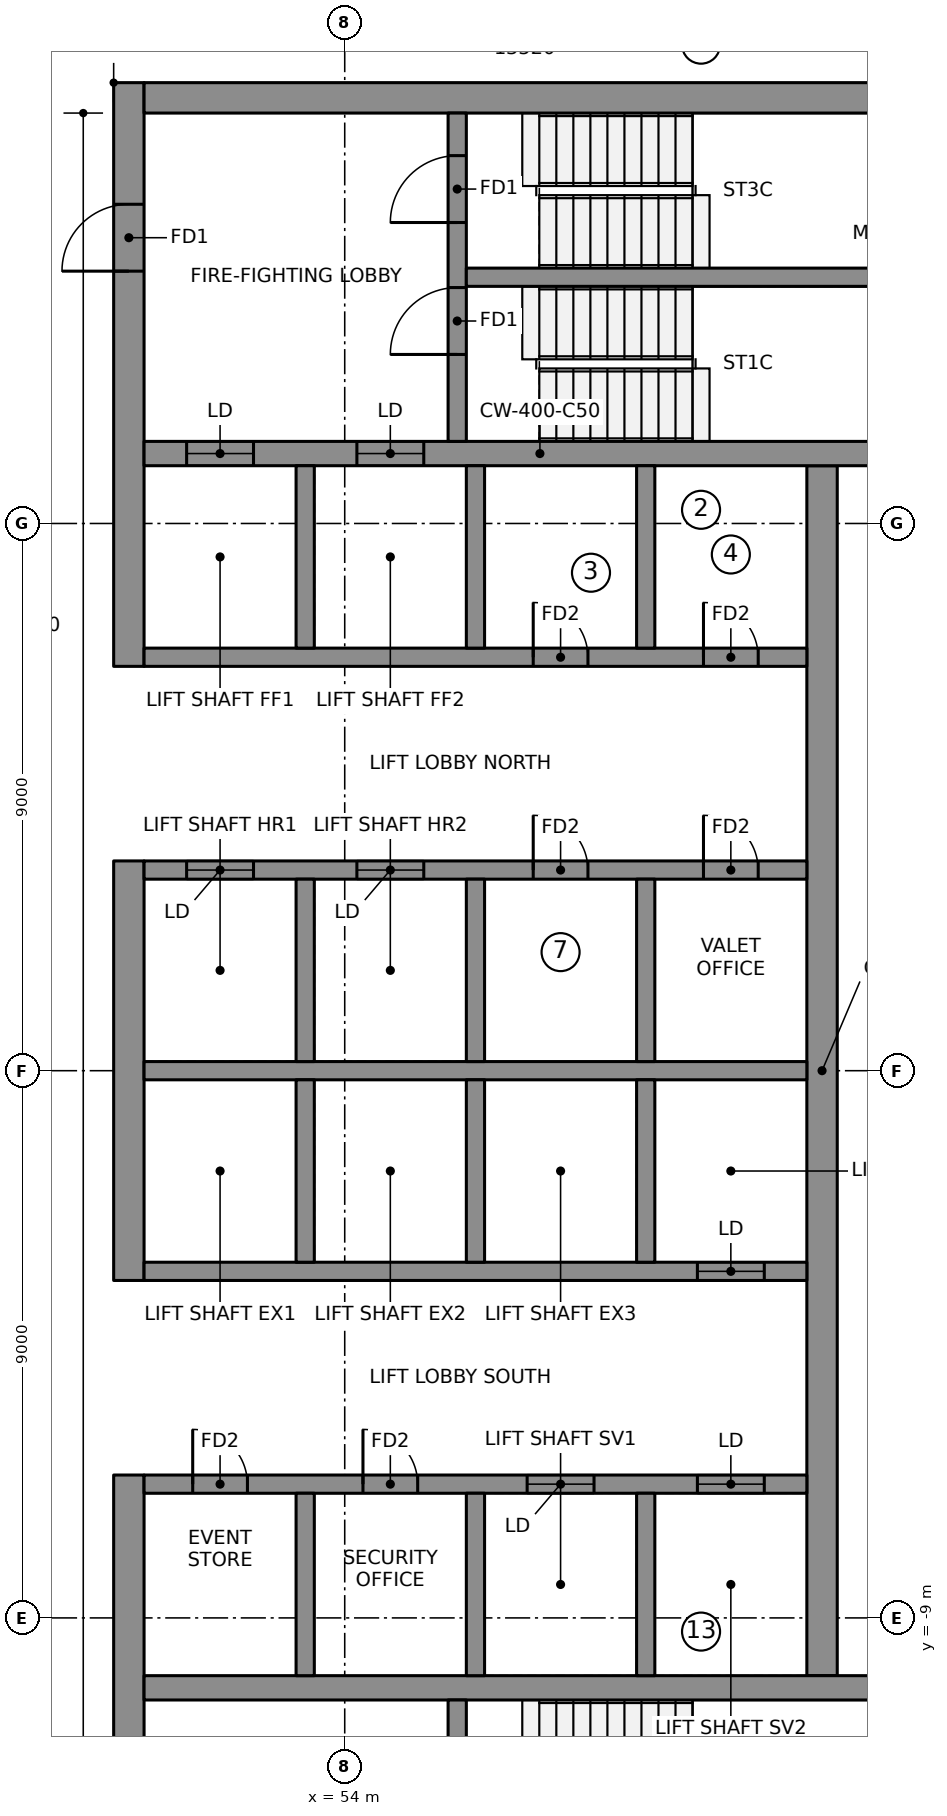
"""IFC4 building model, lengths in metres.
Left out: names, types, materials, properties, quantities, classifications, styles, units other than length and angle.
Written with IfcOpenShell. Run it as: python <this file> out.ifc"""

import sys

from ifc_helpers import new_model, si_unit, direction, frame, frame_2d, origin, place, context, subcontext, project, spatial, rectangle, extrude, element, fill, save


model = new_model("IFC4")
c1 = context("Model", 3, precision=1e-05, world=origin(), true_north=direction((0.0, 1.0)))
c2 = subcontext(c1, "Body", "Model", "MODEL_VIEW")
j1 = project(units=[si_unit("LENGTHUNIT", "METRE"), si_unit("PLANEANGLEUNIT", "RADIAN")], contexts=[c1])
p1 = place(None, origin())
s1 = spatial("IfcSite", under=j1, at=p1, CompositionType="ELEMENT")
p2 = place(p1, origin())
s2 = spatial("IfcBuilding", under=s1, at=p2, CompositionType="ELEMENT")
p3 = place(p2, frame((0.0, 0.0, 275.0)))
s3 = spatial("IfcBuildingStorey", under=s2, at=p3, CompositionType="ELEMENT", Elevation=275.0)
p4 = place(p3, frame((50.45, 6.65, 0.0), z_axis=(0.0, 0.0, 1.0), x_axis=(0.0, 1.0, 0.0)))
e1 = element("IfcWall", 1, at=p4, inside=s3, PredefinedType="SHEAR", context=c2, shape_type="SweptSolid", body=[
    extrude(rectangle(XDim=9.6, YDim=0.5, at=frame_2d((4.8, 0.0))), origin(), (0.0, 0.0, 1.0), 3.55),
])
p5 = place(p4, frame((6.5, 0.0, 0.0)))
e2 = element("IfcOpeningElement", 2, at=p5, cuts=e1, PredefinedType="OPENING", context=c2, shape_type="SweptSolid", body=[
    extrude(rectangle(XDim=1.1, YDim=2.1, at=frame_2d((0.55, 1.05))), frame((0.0, 0.26, 0.0), z_axis=(0.0, -1.0, 0.0), x_axis=(1.0, 0.0, 0.0)), (0.0, 0.0, 1.0), 0.52),
])
p6 = place(p3, frame((50.45, -3.45, 0.0), z_axis=(0.0, 0.0, 1.0), x_axis=(0.0, 1.0, 0.0)))
e3 = element("IfcWall", 3, at=p6, inside=s3, PredefinedType="SHEAR", context=c2, shape_type="SweptSolid", body=[
    extrude(rectangle(XDim=6.9, YDim=0.5, at=frame_2d((3.45, 0.0))), origin(), (0.0, 0.0, 1.0), 3.55),
])
p7 = place(p3, frame((50.45, -16.25, 0.0), z_axis=(0.0, 0.0, 1.0), x_axis=(0.0, 1.0, 0.0)))
e4 = element("IfcWall", 4, at=p7, inside=s3, PredefinedType="SHEAR", context=c2, shape_type="SweptSolid", body=[
    extrude(rectangle(XDim=9.6, YDim=0.5, at=frame_2d((4.8, 0.0))), origin(), (0.0, 0.0, 1.0), 3.55),
])
p8 = place(p7, frame((2.0, 0.0, 0.0)))
e5 = element("IfcOpeningElement", 5, at=p8, cuts=e4, PredefinedType="OPENING", context=c2, shape_type="SweptSolid", body=[
    extrude(rectangle(XDim=1.1, YDim=2.1, at=frame_2d((0.55, 1.05))), frame((0.0, 0.26, 0.0), z_axis=(0.0, -1.0, 0.0), x_axis=(1.0, 0.0, 0.0)), (0.0, 0.0, 1.0), 0.52),
])
p9 = place(p3, frame((50.7, 16.0, 0.0), z_axis=(0.0, 0.0, 1.0), x_axis=(1.0, 0.0, 0.0)))
e6 = element("IfcWall", 6, at=p9, inside=s3, PredefinedType="SHEAR", context=c2, shape_type="SweptSolid", body=[
    extrude(rectangle(XDim=13.52, YDim=0.5, at=frame_2d((6.76, 0.0))), origin(), (0.0, 0.0, 1.0), 3.55),
])
p10 = place(p3, frame((61.85, -9.95, 0.0), z_axis=(0.0, 0.0, 1.0), x_axis=(0.0, 1.0, 0.0)))
e7 = element("IfcWall", 7, at=p10, inside=s3, PredefinedType="SHEAR", context=c2, shape_type="SweptSolid", body=[
    extrude(rectangle(XDim=19.9, YDim=0.5, at=frame_2d((9.95, 0.0))), origin(), (0.0, 0.0, 1.0), 3.55),
])
p11 = place(p3, frame((50.7, 10.15, 0.0), z_axis=(0.0, 0.0, 1.0), x_axis=(1.0, 0.0, 0.0)))
e8 = element("IfcWall", 8, at=p11, inside=s3, PredefinedType="SHEAR", context=c2, shape_type="SweptSolid", body=[
    extrude(rectangle(XDim=13.02, YDim=0.4, at=frame_2d((6.51, 0.0))), origin(), (0.0, 0.0, 1.0), 3.55),
])
p12 = place(p11, frame((0.7, 0.0, 0.0)))
e9 = element("IfcOpeningElement", 9, at=p12, cuts=e8, PredefinedType="OPENING", context=c2, shape_type="SweptSolid", body=[
    extrude(rectangle(XDim=1.1, YDim=2.1, at=frame_2d((0.55, 1.05))), frame((0.0, 0.21, 0.0), z_axis=(0.0, -1.0, 0.0), x_axis=(1.0, 0.0, 0.0)), (0.0, 0.0, 1.0), 0.42),
])
p13 = place(p11, frame((3.5, 0.0, 0.0)))
e10 = element("IfcOpeningElement", 10, at=p13, cuts=e8, PredefinedType="OPENING", context=c2, shape_type="SweptSolid", body=[
    extrude(rectangle(XDim=1.1, YDim=2.1, at=frame_2d((0.55, 1.05))), frame((0.0, 0.21, 0.0), z_axis=(0.0, -1.0, 0.0), x_axis=(1.0, 0.0, 0.0)), (0.0, 0.0, 1.0), 0.42),
])
p14 = place(p3, frame((50.7, -10.15, 0.0), z_axis=(0.0, 0.0, 1.0), x_axis=(1.0, 0.0, 0.0)))
e11 = element("IfcWall", 11, at=p14, inside=s3, PredefinedType="SHEAR", context=c2, shape_type="SweptSolid", body=[
    extrude(rectangle(XDim=13.02, YDim=0.4, at=frame_2d((6.51, 0.0))), origin(), (0.0, 0.0, 1.0), 3.55),
])
p15 = place(p3, frame((50.7, 0.0, 0.0), z_axis=(0.0, 0.0, 1.0), x_axis=(1.0, 0.0, 0.0)))
e12 = element("IfcWall", 12, at=p15, inside=s3, PredefinedType="SHEAR", context=c2, shape_type="SweptSolid", body=[
    extrude(rectangle(XDim=10.9, YDim=0.3, at=frame_2d((5.45, 0.0))), origin(), (0.0, 0.0, 1.0), 3.55),
])
p16 = place(p3, frame((50.7, 3.3, 0.0), z_axis=(0.0, 0.0, 1.0), x_axis=(1.0, 0.0, 0.0)))
e13 = element("IfcWall", 13, at=p16, inside=s3, PredefinedType="SHEAR", context=c2, shape_type="SweptSolid", body=[
    extrude(rectangle(XDim=10.9, YDim=0.3, at=frame_2d((5.45, 0.0))), origin(), (0.0, 0.0, 1.0), 3.55),
])
p17 = place(p16, frame((0.7, 0.0, 0.0)))
e14 = element("IfcOpeningElement", 14, at=p17, cuts=e13, PredefinedType="OPENING", context=c2, shape_type="SweptSolid", body=[
    extrude(rectangle(XDim=1.1, YDim=2.1, at=frame_2d((0.55, 1.05))), frame((0.0, 0.16, 0.0), z_axis=(0.0, -1.0, 0.0), x_axis=(1.0, 0.0, 0.0)), (0.0, 0.0, 1.0), 0.32),
])
p18 = place(p16, frame((3.5, 0.0, 0.0)))
e15 = element("IfcOpeningElement", 15, at=p18, cuts=e13, PredefinedType="OPENING", context=c2, shape_type="SweptSolid", body=[
    extrude(rectangle(XDim=1.1, YDim=2.1, at=frame_2d((0.55, 1.05))), frame((0.0, 0.16, 0.0), z_axis=(0.0, -1.0, 0.0), x_axis=(1.0, 0.0, 0.0)), (0.0, 0.0, 1.0), 0.32),
])
p19 = place(p16, frame((6.4, 0.0, 0.0)))
e16 = element("IfcOpeningElement", 16, at=p19, cuts=e13, PredefinedType="OPENING", context=c2, shape_type="SweptSolid", body=[
    extrude(rectangle(XDim=0.9, YDim=2.1, at=frame_2d((0.45, 1.05))), frame((0.0, 0.16, 0.0), z_axis=(0.0, -1.0, 0.0), x_axis=(1.0, 0.0, 0.0)), (0.0, 0.0, 1.0), 0.32),
])
p20 = place(p16, frame((9.2, 0.0, 0.0)))
e17 = element("IfcOpeningElement", 17, at=p20, cuts=e13, PredefinedType="OPENING", context=c2, shape_type="SweptSolid", body=[
    extrude(rectangle(XDim=0.9, YDim=2.1, at=frame_2d((0.45, 1.05))), frame((0.0, 0.16, 0.0), z_axis=(0.0, -1.0, 0.0), x_axis=(1.0, 0.0, 0.0)), (0.0, 0.0, 1.0), 0.32),
])
p21 = place(p3, frame((50.7, 6.8, 0.0), z_axis=(0.0, 0.0, 1.0), x_axis=(1.0, 0.0, 0.0)))
e18 = element("IfcWall", 18, at=p21, inside=s3, PredefinedType="SHEAR", context=c2, shape_type="SweptSolid", body=[
    extrude(rectangle(XDim=10.9, YDim=0.3, at=frame_2d((5.45, 0.0))), origin(), (0.0, 0.0, 1.0), 3.55),
])
p22 = place(p21, frame((6.4, 0.0, 0.0)))
e19 = element("IfcOpeningElement", 19, at=p22, cuts=e18, PredefinedType="OPENING", context=c2, shape_type="SweptSolid", body=[
    extrude(rectangle(XDim=0.9, YDim=2.1, at=frame_2d((0.45, 1.05))), frame((0.0, 0.16, 0.0), z_axis=(0.0, -1.0, 0.0), x_axis=(1.0, 0.0, 0.0)), (0.0, 0.0, 1.0), 0.32),
])
p23 = place(p21, frame((9.2, 0.0, 0.0)))
e20 = element("IfcOpeningElement", 20, at=p23, cuts=e18, PredefinedType="OPENING", context=c2, shape_type="SweptSolid", body=[
    extrude(rectangle(XDim=0.9, YDim=2.1, at=frame_2d((0.45, 1.05))), frame((0.0, 0.16, 0.0), z_axis=(0.0, -1.0, 0.0), x_axis=(1.0, 0.0, 0.0)), (0.0, 0.0, 1.0), 0.32),
])
for number, where, z_axis, x_axis in (
    (21, (53.35, 0.15, 0.0), (0.0, 0.0, 1.0), (0.0, 1.0, 0.0)),
    (22, (53.35, 6.95, 0.0), (0.0, 0.0, 1.0), (0.0, 1.0, 0.0)),
    (23, (56.15, 0.15, 0.0), (0.0, 0.0, 1.0), (0.0, 1.0, 0.0)),
    (24, (56.15, 6.95, 0.0), (0.0, 0.0, 1.0), (0.0, 1.0, 0.0)),
    (25, (58.95, 0.15, 0.0), (0.0, 0.0, 1.0), (0.0, 1.0, 0.0)),
    (26, (58.95, 6.95, 0.0), (0.0, 0.0, 1.0), (0.0, 1.0, 0.0)),
):
    element("IfcWall", number, at=place(p3, frame(where, z_axis=z_axis, x_axis=x_axis)), inside=s3, PredefinedType="SHEAR", context=c2, shape_type="SweptSolid", body=[
        extrude(rectangle(XDim=3.0, YDim=0.3, at=frame_2d((1.5, 0.0))), origin(), (0.0, 0.0, 1.0), 3.55),
    ])
p24 = place(p3, frame((50.7, -3.3, 0.0), z_axis=(0.0, 0.0, 1.0), x_axis=(1.0, 0.0, 0.0)))
e27 = element("IfcWall", 27, at=p24, inside=s3, PredefinedType="SHEAR", context=c2, shape_type="SweptSolid", body=[
    extrude(rectangle(XDim=10.9, YDim=0.3, at=frame_2d((5.45, 0.0))), origin(), (0.0, 0.0, 1.0), 3.55),
])
p25 = place(p24, frame((9.1, 0.0, 0.0)))
e28 = element("IfcOpeningElement", 28, at=p25, cuts=e27, PredefinedType="OPENING", context=c2, shape_type="SweptSolid", body=[
    extrude(rectangle(XDim=1.1, YDim=2.1, at=frame_2d((0.55, 1.05))), frame((0.0, 0.16, 0.0), z_axis=(0.0, -1.0, 0.0), x_axis=(1.0, 0.0, 0.0)), (0.0, 0.0, 1.0), 0.32),
])
p26 = place(p3, frame((50.7, -6.8, 0.0), z_axis=(0.0, 0.0, 1.0), x_axis=(1.0, 0.0, 0.0)))
e29 = element("IfcWall", 29, at=p26, inside=s3, PredefinedType="SHEAR", context=c2, shape_type="SweptSolid", body=[
    extrude(rectangle(XDim=10.9, YDim=0.3, at=frame_2d((5.45, 0.0))), origin(), (0.0, 0.0, 1.0), 3.55),
])
p27 = place(p26, frame((6.3, 0.0, 0.0)))
e30 = element("IfcOpeningElement", 30, at=p27, cuts=e29, PredefinedType="OPENING", context=c2, shape_type="SweptSolid", body=[
    extrude(rectangle(XDim=1.1, YDim=2.1, at=frame_2d((0.55, 1.05))), frame((0.0, 0.16, 0.0), z_axis=(0.0, -1.0, 0.0), x_axis=(1.0, 0.0, 0.0)), (0.0, 0.0, 1.0), 0.32),
])
p28 = place(p26, frame((9.1, 0.0, 0.0)))
e31 = element("IfcOpeningElement", 31, at=p28, cuts=e29, PredefinedType="OPENING", context=c2, shape_type="SweptSolid", body=[
    extrude(rectangle(XDim=1.1, YDim=2.1, at=frame_2d((0.55, 1.05))), frame((0.0, 0.16, 0.0), z_axis=(0.0, -1.0, 0.0), x_axis=(1.0, 0.0, 0.0)), (0.0, 0.0, 1.0), 0.32),
])
p29 = place(p26, frame((0.8, 0.0, 0.0)))
e32 = element("IfcOpeningElement", 32, at=p29, cuts=e29, PredefinedType="OPENING", context=c2, shape_type="SweptSolid", body=[
    extrude(rectangle(XDim=0.9, YDim=2.1, at=frame_2d((0.45, 1.05))), frame((0.0, 0.16, 0.0), z_axis=(0.0, -1.0, 0.0), x_axis=(1.0, 0.0, 0.0)), (0.0, 0.0, 1.0), 0.32),
])
p30 = place(p26, frame((3.6, 0.0, 0.0)))
e33 = element("IfcOpeningElement", 33, at=p30, cuts=e29, PredefinedType="OPENING", context=c2, shape_type="SweptSolid", body=[
    extrude(rectangle(XDim=0.9, YDim=2.1, at=frame_2d((0.45, 1.05))), frame((0.0, 0.16, 0.0), z_axis=(0.0, -1.0, 0.0), x_axis=(1.0, 0.0, 0.0)), (0.0, 0.0, 1.0), 0.32),
])
for number, where, z_axis, x_axis in (
    (34, (53.35, -3.15, 0.0), (0.0, 0.0, 1.0), (0.0, 1.0, 0.0)),
    (35, (53.35, -9.95, 0.0), (0.0, 0.0, 1.0), (0.0, 1.0, 0.0)),
    (36, (56.15, -3.15, 0.0), (0.0, 0.0, 1.0), (0.0, 1.0, 0.0)),
    (37, (56.15, -9.95, 0.0), (0.0, 0.0, 1.0), (0.0, 1.0, 0.0)),
    (38, (58.95, -3.15, 0.0), (0.0, 0.0, 1.0), (0.0, 1.0, 0.0)),
    (39, (58.95, -9.95, 0.0), (0.0, 0.0, 1.0), (0.0, 1.0, 0.0)),
):
    element("IfcWall", number, at=place(p3, frame(where, z_axis=z_axis, x_axis=x_axis)), inside=s3, PredefinedType="SHEAR", context=c2, shape_type="SweptSolid", body=[
        extrude(rectangle(XDim=3.0, YDim=0.3, at=frame_2d((1.5, 0.0))), origin(), (0.0, 0.0, 1.0), 3.55),
    ])
p31 = place(p3, frame((55.85, 10.35, 0.0), z_axis=(0.0, 0.0, 1.0), x_axis=(0.0, 1.0, 0.0)))
e40 = element("IfcWall", 40, at=p31, inside=s3, PredefinedType="SHEAR", context=c2, shape_type="SweptSolid", body=[
    extrude(rectangle(XDim=5.4, YDim=0.3, at=frame_2d((2.7, 0.0))), origin(), (0.0, 0.0, 1.0), 3.55),
])
p32 = place(p31, frame((1.43, 0.0, 0.0)))
e41 = element("IfcOpeningElement", 41, at=p32, cuts=e40, PredefinedType="OPENING", context=c2, shape_type="SweptSolid", body=[
    extrude(rectangle(XDim=1.1, YDim=2.1, at=frame_2d((0.55, 1.05))), frame((0.0, 0.16, 0.0), z_axis=(0.0, -1.0, 0.0), x_axis=(1.0, 0.0, 0.0)), (0.0, 0.0, 1.0), 0.32),
])
p33 = place(p31, frame((3.6, 0.0, 0.0)))
e42 = element("IfcOpeningElement", 42, at=p33, cuts=e40, PredefinedType="OPENING", context=c2, shape_type="SweptSolid", body=[
    extrude(rectangle(XDim=1.1, YDim=2.1, at=frame_2d((0.55, 1.05))), frame((0.0, 0.16, 0.0), z_axis=(0.0, -1.0, 0.0), x_axis=(1.0, 0.0, 0.0)), (0.0, 0.0, 1.0), 0.32),
])
p34 = place(p3, frame((55.85, -15.75, 0.0), z_axis=(0.0, 0.0, 1.0), x_axis=(0.0, 1.0, 0.0)))
e43 = element("IfcWall", 43, at=p34, inside=s3, PredefinedType="SHEAR", context=c2, shape_type="SweptSolid", body=[
    extrude(rectangle(XDim=5.4, YDim=0.3, at=frame_2d((2.7, 0.0))), origin(), (0.0, 0.0, 1.0), 3.55),
])
p35 = place(p34, frame((3.6, 0.0, 0.0)))
e44 = element("IfcOpeningElement", 44, at=p35, cuts=e43, PredefinedType="OPENING", context=c2, shape_type="SweptSolid", body=[
    extrude(rectangle(XDim=1.1, YDim=2.1, at=frame_2d((0.55, 1.05))), frame((0.0, 0.16, 0.0), z_axis=(0.0, -1.0, 0.0), x_axis=(1.0, 0.0, 0.0)), (0.0, 0.0, 1.0), 0.32),
])
p36 = place(p34, frame((0.8, 0.0, 0.0)))
e45 = element("IfcOpeningElement", 45, at=p36, cuts=e43, PredefinedType="OPENING", context=c2, shape_type="SweptSolid", body=[
    extrude(rectangle(XDim=0.9, YDim=2.1, at=frame_2d((0.45, 1.05))), frame((0.0, 0.16, 0.0), z_axis=(0.0, -1.0, 0.0), x_axis=(1.0, 0.0, 0.0)), (0.0, 0.0, 1.0), 0.32),
])
p37 = place(p3, frame((56.0, 13.05, 0.0), z_axis=(0.0, 0.0, 1.0), x_axis=(1.0, 0.0, 0.0)))
e46 = element("IfcWall", 46, at=p37, inside=s3, PredefinedType="SHEAR", context=c2, shape_type="SweptSolid", body=[
    extrude(rectangle(XDim=7.72, YDim=0.3, at=frame_2d((3.86, 0.0))), origin(), (0.0, 0.0, 1.0), 3.55),
])
p38 = place(p12, origin())
e47 = element("IfcDoor", 47, at=p38, inside=s3, OperationType="DOUBLE_DOOR_SLIDING", PredefinedType="DOOR", context=c2, shape_type="SweptSolid", body=[
    extrude(rectangle(XDim=1.1, YDim=2.1, at=frame_2d((0.55, 1.05))), frame((0.0, 0.025, 0.0), z_axis=(0.0, -1.0, 0.0), x_axis=(1.0, 0.0, 0.0)), (0.0, 0.0, 1.0), 0.05),
])
fill(e9, e47)
p39 = place(p13, origin())
e48 = element("IfcDoor", 48, at=p39, inside=s3, OperationType="DOUBLE_DOOR_SLIDING", PredefinedType="DOOR", context=c2, shape_type="SweptSolid", body=[
    extrude(rectangle(XDim=1.1, YDim=2.1, at=frame_2d((0.55, 1.05))), frame((0.0, 0.025, 0.0), z_axis=(0.0, -1.0, 0.0), x_axis=(1.0, 0.0, 0.0)), (0.0, 0.0, 1.0), 0.05),
])
fill(e10, e48)
p40 = place(p17, origin())
e49 = element("IfcDoor", 49, at=p40, inside=s3, OperationType="DOUBLE_DOOR_SLIDING", PredefinedType="DOOR", context=c2, shape_type="SweptSolid", body=[
    extrude(rectangle(XDim=1.1, YDim=2.1, at=frame_2d((0.55, 1.05))), frame((0.0, 0.025, 0.0), z_axis=(0.0, -1.0, 0.0), x_axis=(1.0, 0.0, 0.0)), (0.0, 0.0, 1.0), 0.05),
])
fill(e14, e49)
p41 = place(p18, origin())
e50 = element("IfcDoor", 50, at=p41, inside=s3, OperationType="DOUBLE_DOOR_SLIDING", PredefinedType="DOOR", context=c2, shape_type="SweptSolid", body=[
    extrude(rectangle(XDim=1.1, YDim=2.1, at=frame_2d((0.55, 1.05))), frame((0.0, 0.025, 0.0), z_axis=(0.0, -1.0, 0.0), x_axis=(1.0, 0.0, 0.0)), (0.0, 0.0, 1.0), 0.05),
])
fill(e15, e50)
p42 = place(p25, origin())
e51 = element("IfcDoor", 51, at=p42, inside=s3, OperationType="DOUBLE_DOOR_SLIDING", PredefinedType="DOOR", context=c2, shape_type="SweptSolid", body=[
    extrude(rectangle(XDim=1.1, YDim=2.1, at=frame_2d((0.55, 1.05))), frame((0.0, 0.025, 0.0), z_axis=(0.0, -1.0, 0.0), x_axis=(1.0, 0.0, 0.0)), (0.0, 0.0, 1.0), 0.05),
])
fill(e28, e51)
p43 = place(p27, origin())
e52 = element("IfcDoor", 52, at=p43, inside=s3, OperationType="DOUBLE_DOOR_SLIDING", PredefinedType="DOOR", context=c2, shape_type="SweptSolid", body=[
    extrude(rectangle(XDim=1.1, YDim=2.1, at=frame_2d((0.55, 1.05))), frame((0.0, 0.025, 0.0), z_axis=(0.0, -1.0, 0.0), x_axis=(1.0, 0.0, 0.0)), (0.0, 0.0, 1.0), 0.05),
])
fill(e30, e52)
p44 = place(p28, origin())
e53 = element("IfcDoor", 53, at=p44, inside=s3, OperationType="DOUBLE_DOOR_SLIDING", PredefinedType="DOOR", context=c2, shape_type="SweptSolid", body=[
    extrude(rectangle(XDim=1.1, YDim=2.1, at=frame_2d((0.55, 1.05))), frame((0.0, 0.025, 0.0), z_axis=(0.0, -1.0, 0.0), x_axis=(1.0, 0.0, 0.0)), (0.0, 0.0, 1.0), 0.05),
])
fill(e31, e53)
p45 = place(p32, origin())
e54 = element("IfcDoor", 54, at=p45, inside=s3, OperationType="SINGLE_SWING_RIGHT", PredefinedType="DOOR", context=c2, shape_type="SweptSolid", body=[
    extrude(rectangle(XDim=1.1, YDim=2.1, at=frame_2d((0.55, 1.05))), frame((0.0, 0.025, 0.0), z_axis=(0.0, -1.0, 0.0), x_axis=(1.0, 0.0, 0.0)), (0.0, 0.0, 1.0), 0.05),
])
fill(e41, e54)
p46 = place(p33, origin())
e55 = element("IfcDoor", 55, at=p46, inside=s3, OperationType="SINGLE_SWING_RIGHT", PredefinedType="DOOR", context=c2, shape_type="SweptSolid", body=[
    extrude(rectangle(XDim=1.1, YDim=2.1, at=frame_2d((0.55, 1.05))), frame((0.0, 0.025, 0.0), z_axis=(0.0, -1.0, 0.0), x_axis=(1.0, 0.0, 0.0)), (0.0, 0.0, 1.0), 0.05),
])
fill(e42, e55)
p47 = place(p5, origin())
e56 = element("IfcDoor", 56, at=p47, inside=s3, OperationType="SINGLE_SWING_RIGHT", PredefinedType="DOOR", context=c2, shape_type="SweptSolid", body=[
    extrude(rectangle(XDim=1.1, YDim=2.1, at=frame_2d((0.55, 1.05))), frame((0.0, 0.025, 0.0), z_axis=(0.0, -1.0, 0.0), x_axis=(1.0, 0.0, 0.0)), (0.0, 0.0, 1.0), 0.05),
])
fill(e2, e56)
p48 = place(p22, origin())
e57 = element("IfcDoor", 57, at=p48, inside=s3, OperationType="SINGLE_SWING_LEFT", PredefinedType="DOOR", context=c2, shape_type="SweptSolid", body=[
    extrude(rectangle(XDim=0.9, YDim=2.1, at=frame_2d((0.45, 1.05))), frame((0.0, 0.025, 0.0), z_axis=(0.0, -1.0, 0.0), x_axis=(1.0, 0.0, 0.0)), (0.0, 0.0, 1.0), 0.05),
])
fill(e19, e57)
p49 = place(p23, origin())
e58 = element("IfcDoor", 58, at=p49, inside=s3, OperationType="SINGLE_SWING_LEFT", PredefinedType="DOOR", context=c2, shape_type="SweptSolid", body=[
    extrude(rectangle(XDim=0.9, YDim=2.1, at=frame_2d((0.45, 1.05))), frame((0.0, 0.025, 0.0), z_axis=(0.0, -1.0, 0.0), x_axis=(1.0, 0.0, 0.0)), (0.0, 0.0, 1.0), 0.05),
])
fill(e20, e58)
p50 = place(p19, origin())
e59 = element("IfcDoor", 59, at=p50, inside=s3, OperationType="SINGLE_SWING_LEFT", PredefinedType="DOOR", context=c2, shape_type="SweptSolid", body=[
    extrude(rectangle(XDim=0.9, YDim=2.1, at=frame_2d((0.45, 1.05))), frame((0.0, 0.025, 0.0), z_axis=(0.0, -1.0, 0.0), x_axis=(1.0, 0.0, 0.0)), (0.0, 0.0, 1.0), 0.05),
])
fill(e16, e59)
p51 = place(p20, origin())
e60 = element("IfcDoor", 60, at=p51, inside=s3, OperationType="SINGLE_SWING_LEFT", PredefinedType="DOOR", context=c2, shape_type="SweptSolid", body=[
    extrude(rectangle(XDim=0.9, YDim=2.1, at=frame_2d((0.45, 1.05))), frame((0.0, 0.025, 0.0), z_axis=(0.0, -1.0, 0.0), x_axis=(1.0, 0.0, 0.0)), (0.0, 0.0, 1.0), 0.05),
])
fill(e17, e60)
p52 = place(p29, origin())
e61 = element("IfcDoor", 61, at=p52, inside=s3, OperationType="SINGLE_SWING_LEFT", PredefinedType="DOOR", context=c2, shape_type="SweptSolid", body=[
    extrude(rectangle(XDim=0.9, YDim=2.1, at=frame_2d((0.45, 1.05))), frame((0.0, 0.025, 0.0), z_axis=(0.0, -1.0, 0.0), x_axis=(1.0, 0.0, 0.0)), (0.0, 0.0, 1.0), 0.05),
])
fill(e32, e61)
p53 = place(p30, origin())
e62 = element("IfcDoor", 62, at=p53, inside=s3, OperationType="SINGLE_SWING_LEFT", PredefinedType="DOOR", context=c2, shape_type="SweptSolid", body=[
    extrude(rectangle(XDim=0.9, YDim=2.1, at=frame_2d((0.45, 1.05))), frame((0.0, 0.025, 0.0), z_axis=(0.0, -1.0, 0.0), x_axis=(1.0, 0.0, 0.0)), (0.0, 0.0, 1.0), 0.05),
])
fill(e33, e62)
save(model, sys.argv[1])
